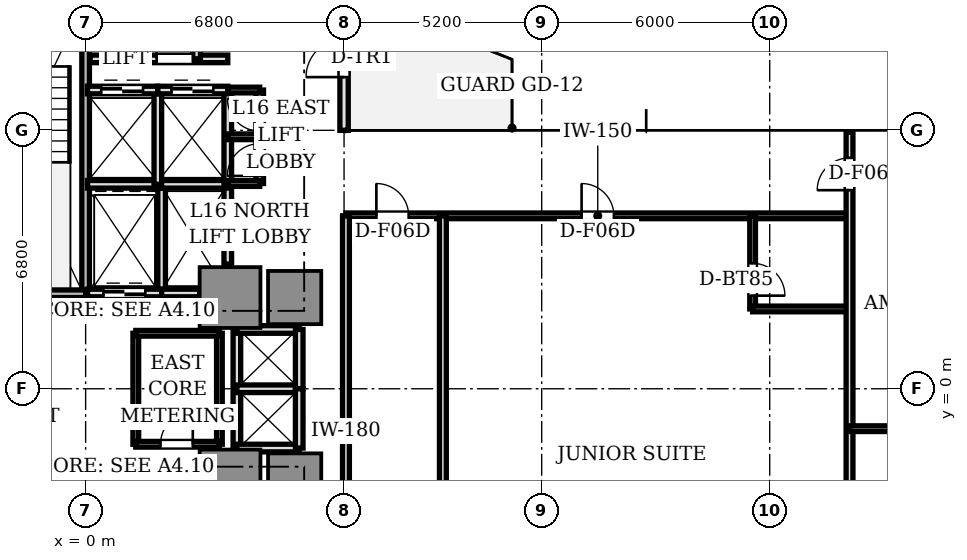
"""IFC4 building model, lengths in metres.
Left out: names, types, materials, properties, quantities, classifications, styles, units other than length and angle.
Written with IfcOpenShell. Run it as: python <this file> out.ifc"""

import sys

from ifc_helpers import new_model, si_unit, direction, frame, frame_2d, origin, origin_2d, place, context, subcontext, project, spatial, rectangle, extrude, source, transform, mapped, element, fill, save


model = new_model("IFC4")
c1 = context("Model", 3, precision=1e-05, world=origin(), true_north=direction((0.0, 1.0)))
c2 = subcontext(c1, "Body", "Model", "MODEL_VIEW")
j1 = project(units=[si_unit("LENGTHUNIT", "METRE"), si_unit("PLANEANGLEUNIT", "RADIAN")], contexts=[c1])
p1 = place(None, origin())
s1 = spatial("IfcSite", under=j1, at=p1, CompositionType="ELEMENT")
p2 = place(p1, origin())
s2 = spatial("IfcBuilding", under=s1, at=p2, CompositionType="ELEMENT")
p3 = place(p2, frame((0.0, 0.0, 61.1)))
s3 = spatial("IfcBuildingStorey", under=s2, at=p3, CompositionType="ELEMENT", Elevation=61.1)
m1 = source(origin(), c2, "Body", "SweptSolid", [
    extrude(rectangle(XDim=1.6, YDim=1.6, at=origin_2d()), origin(), (0.0, 0.0, 1.0), 3.11),
])
for number, where, z_axis, x_axis in (
    (1, (3.8, 2.4, 0.0), (0.0, 0.0, 1.0), (1.0, 0.0, 0.0)),
    (2, (3.8, -2.4, 0.0), (0.0, 0.0, 1.0), (1.0, 0.0, 0.0)),
):
    element("IfcColumn", number, at=place(p3, frame(where, z_axis=z_axis, x_axis=x_axis)), inside=s3, PredefinedType="COLUMN", context=c2, shape_type="MappedRepresentation", body=[
        mapped(m1, transform((0.0, 0.0, 0.0), scale=1.0)),
    ])
m2 = source(origin(), c2, "Body", "SweptSolid", [
    extrude(rectangle(XDim=1.4, YDim=1.4, at=origin_2d()), origin(), (0.0, 0.0, 1.0), 3.11),
])
for number, where, z_axis, x_axis in (
    (3, (5.5, 2.4, 0.0), (0.0, 0.0, 1.0), (1.0, 0.0, 0.0)),
    (4, (5.5, -2.4, 0.0), (0.0, 0.0, 1.0), (1.0, 0.0, 0.0)),
):
    element("IfcColumn", number, at=place(p3, frame(where, z_axis=z_axis, x_axis=x_axis)), inside=s3, PredefinedType="COLUMN", context=c2, shape_type="MappedRepresentation", body=[
        mapped(m2, transform((0.0, 0.0, 0.0), scale=1.0)),
    ])
p4 = place(p3, frame((6.8, 6.8, 0.0), z_axis=(0.0, 0.0, 1.0), x_axis=(0.0, 1.0, 0.0)))
e5 = element("IfcWall", 5, at=p4, inside=s3, PredefinedType="STANDARD", context=c2, shape_type="SweptSolid", body=[
    extrude(rectangle(XDim=2.7, YDim=0.22, at=frame_2d((1.35, 0.0))), origin(), (0.0, 0.0, 1.0), 3.11),
])
p5 = place(p4, frame((1.4, 0.0, 0.0)))
e6 = element("IfcOpeningElement", 6, at=p5, cuts=e5, PredefinedType="OPENING", context=c2, shape_type="SweptSolid", body=[
    extrude(rectangle(XDim=1.0, YDim=2.2, at=frame_2d((0.5, 1.1))), frame((0.0, 0.12, 0.0), z_axis=(0.0, -1.0, 0.0), x_axis=(1.0, 0.0, 0.0)), (0.0, 0.0, 1.0), 0.24),
])
p6 = place(p3, frame((0.0, 2.5, 0.0), z_axis=(0.0, 0.0, 1.0), x_axis=(0.0, 1.0, 0.0)))
e7 = element("IfcWall", 7, at=p6, inside=s3, PredefinedType="SOLIDWALL", context=c2, shape_type="SweptSolid", body=[
    extrude(rectangle(XDim=7.68, YDim=0.2, at=frame_2d((3.84, 0.0))), origin(), (0.0, 0.0, 1.0), 3.11),
])
p7 = place(p6, frame((6.5, 0.0, 0.0)))
e8 = element("IfcOpeningElement", 8, at=p7, cuts=e7, PredefinedType="OPENING", context=c2, shape_type="SweptSolid", body=[
    extrude(rectangle(XDim=0.95, YDim=2.15, at=frame_2d((0.475, 1.075))), frame((0.0, 0.11, 0.0), z_axis=(0.0, -1.0, 0.0), x_axis=(1.0, 0.0, 0.0)), (0.0, 0.0, 1.0), 0.22),
])
p8 = place(p3, frame((-3.72, 2.5, 0.0), z_axis=(0.0, 0.0, 1.0), x_axis=(1.0, 0.0, 0.0)))
e9 = element("IfcWall", 9, at=p8, inside=s3, PredefinedType="SOLIDWALL", context=c2, shape_type="SweptSolid", body=[
    extrude(rectangle(XDim=3.72, YDim=0.2, at=frame_2d((1.86, 0.0))), origin(), (0.0, 0.0, 1.0), 3.11),
])
p9 = place(p3, frame((2.0, 2.5, 0.0), z_axis=(0.0, 0.0, 1.0), x_axis=(0.0, 1.0, 0.0)))
e10 = element("IfcWall", 10, at=p9, inside=s3, PredefinedType="SOLIDWALL", context=c2, shape_type="SweptSolid", body=[
    extrude(rectangle(XDim=2.78, YDim=0.2, at=frame_2d((1.39, 0.0))), origin(), (0.0, 0.0, 1.0), 2.66),
])
p10 = place(p3, frame((0.05, 2.52, 0.0), z_axis=(0.0, 0.0, 1.0), x_axis=(1.0, 0.0, 0.0)))
e11 = element("IfcWall", 11, at=p10, inside=s3, PredefinedType="SOLIDWALL", context=c2, shape_type="SweptSolid", body=[
    extrude(rectangle(XDim=1.95, YDim=0.2, at=frame_2d((0.975, 0.0))), origin(), (0.0, 0.0, 1.0), 2.66),
])
p11 = place(p10, frame((0.42, 0.0, 0.0)))
e12 = element("IfcOpeningElement", 12, at=p11, cuts=e11, PredefinedType="OPENING", context=c2, shape_type="SweptSolid", body=[
    extrude(rectangle(XDim=1.1, YDim=2.2, at=frame_2d((0.55, 1.1))), frame((0.0, 0.11, 0.0), z_axis=(0.0, -1.0, 0.0), x_axis=(1.0, 0.0, 0.0)), (0.0, 0.0, 1.0), 0.22),
])
p12 = place(p3, frame((2.0, 2.52, 0.0), z_axis=(0.0, 0.0, 1.0), x_axis=(1.0, 0.0, 0.0)))
e13 = element("IfcWall", 13, at=p12, inside=s3, PredefinedType="SOLIDWALL", context=c2, shape_type="SweptSolid", body=[
    extrude(rectangle(XDim=1.0, YDim=0.2, at=frame_2d((0.5, 0.0))), origin(), (0.0, 0.0, 1.0), 2.66),
])
p13 = place(p3, frame((3.74, 3.28, 0.0), z_axis=(0.0, 0.0, 1.0), x_axis=(0.0, 1.0, 0.0)))
e14 = element("IfcWall", 14, at=p13, inside=s3, PredefinedType="SOLIDWALL", context=c2, shape_type="SweptSolid", body=[
    extrude(rectangle(XDim=2.08, YDim=0.2, at=frame_2d((1.04, 0.0))), origin(), (0.0, 0.0, 1.0), 2.66),
])
p14 = place(p13, frame((0.44, 0.0, 0.0)))
e15 = element("IfcOpeningElement", 15, at=p14, cuts=e14, PredefinedType="OPENING", context=c2, shape_type="SweptSolid", body=[
    extrude(rectangle(XDim=1.2, YDim=2.2, at=frame_2d((0.6, 1.1))), frame((0.0, 0.11, 0.0), z_axis=(0.0, -1.0, 0.0), x_axis=(1.0, 0.0, 0.0)), (0.0, 0.0, 1.0), 0.22),
])
p15 = place(p3, frame((0.05, 5.38, 0.0), z_axis=(0.0, 0.0, 1.0), x_axis=(1.0, 0.0, 0.0)))
e16 = element("IfcWall", 16, at=p15, inside=s3, PredefinedType="SOLIDWALL", context=c2, shape_type="SweptSolid", body=[
    extrude(rectangle(XDim=3.69, YDim=0.2, at=frame_2d((1.845, 0.0))), origin(), (0.0, 0.0, 1.0), 2.66),
])
p16 = place(p3, frame((1.9, 5.38, 0.0), z_axis=(0.0, 0.0, 1.0), x_axis=(0.0, 1.0, 0.0)))
e17 = element("IfcWall", 17, at=p16, inside=s3, PredefinedType="SOLIDWALL", context=c2, shape_type="SweptSolid", body=[
    extrude(rectangle(XDim=2.48, YDim=0.2, at=frame_2d((1.24, 0.0))), origin(), (0.0, 0.0, 1.0), 2.66),
])
p17 = place(p3, frame((0.05, 7.86, 0.0), z_axis=(0.0, 0.0, 1.0), x_axis=(1.0, 0.0, 0.0)))
e18 = element("IfcWall", 18, at=p17, inside=s3, PredefinedType="SOLIDWALL", context=c2, shape_type="SweptSolid", body=[
    extrude(rectangle(XDim=1.85, YDim=0.2, at=frame_2d((0.925, 0.0))), origin(), (0.0, 0.0, 1.0), 2.66),
])
p18 = place(p17, frame((0.36, 0.0, 0.0)))
e19 = element("IfcOpeningElement", 19, at=p18, cuts=e18, PredefinedType="OPENING", context=c2, shape_type="SweptSolid", body=[
    extrude(rectangle(XDim=1.1, YDim=2.2, at=frame_2d((0.55, 1.1))), frame((0.0, 0.11, 0.0), z_axis=(0.0, -1.0, 0.0), x_axis=(1.0, 0.0, 0.0)), (0.0, 0.0, 1.0), 0.22),
])
p19 = place(p3, frame((3.74, 5.38, 0.0), z_axis=(0.0, 0.0, 1.0), x_axis=(0.0, 1.0, 0.0)))
e20 = element("IfcWall", 20, at=p19, inside=s3, PredefinedType="SOLIDWALL", context=c2, shape_type="SweptSolid", body=[
    extrude(rectangle(XDim=2.48, YDim=0.2, at=frame_2d((1.24, 0.0))), origin(), (0.0, 0.0, 1.0), 2.66),
])
p20 = place(p3, frame((1.9, 7.86, 0.0), z_axis=(0.0, 0.0, 1.0), x_axis=(1.0, 0.0, 0.0)))
e21 = element("IfcWall", 21, at=p20, inside=s3, PredefinedType="SOLIDWALL", context=c2, shape_type="SweptSolid", body=[
    extrude(rectangle(XDim=1.84, YDim=0.2, at=frame_2d((0.92, 0.0))), origin(), (0.0, 0.0, 1.0), 2.66),
])
p21 = place(p20, frame((0.36, 0.0, 0.0)))
e22 = element("IfcOpeningElement", 22, at=p21, cuts=e21, PredefinedType="OPENING", context=c2, shape_type="SweptSolid", body=[
    extrude(rectangle(XDim=1.1, YDim=2.2, at=frame_2d((0.55, 1.1))), frame((0.0, 0.11, 0.0), z_axis=(0.0, -1.0, 0.0), x_axis=(1.0, 0.0, 0.0)), (0.0, 0.0, 1.0), 0.22),
])
p22 = place(p3, frame((3.98, -1.56, 0.0), z_axis=(0.0, 0.0, 1.0), x_axis=(0.0, 1.0, 0.0)))
e23 = element("IfcWall", 23, at=p22, inside=s3, PredefinedType="SOLIDWALL", context=c2, shape_type="SweptSolid", body=[
    extrude(rectangle(XDim=3.12, YDim=0.2, at=frame_2d((1.56, 0.0))), origin(), (0.0, 0.0, 1.0), 2.18),
])
for number, where, z_axis, x_axis in (
    (24, (3.98, 1.56, 0.0), (0.0, 0.0, 1.0), (1.0, 0.0, 0.0)),
    (25, (3.98, -1.56, 0.0), (0.0, 0.0, 1.0), (1.0, 0.0, 0.0)),
    (26, (3.98, 0.0, 0.0), (0.0, 0.0, 1.0), (1.0, 0.0, 0.0)),
):
    element("IfcWall", number, at=place(p3, frame(where, z_axis=z_axis, x_axis=x_axis)), inside=s3, PredefinedType="SOLIDWALL", context=c2, shape_type="SweptSolid", body=[
        extrude(rectangle(XDim=1.64, YDim=0.2, at=frame_2d((0.82, 0.0))), origin(), (0.0, 0.0, 1.0), 2.66),
    ])
for number, where, z_axis, x_axis in (
    (27, (5.62, 0.0, 0.0), (0.0, 0.0, 1.0), (0.0, 1.0, 0.0)),
    (28, (5.62, -1.56, 0.0), (0.0, 0.0, 1.0), (0.0, 1.0, 0.0)),
):
    element("IfcWall", number, at=place(p3, frame(where, z_axis=z_axis, x_axis=x_axis)), inside=s3, PredefinedType="SOLIDWALL", context=c2, shape_type="SweptSolid", body=[
        extrude(rectangle(XDim=1.56, YDim=0.2, at=frame_2d((0.78, 0.0))), origin(), (0.0, 0.0, 1.0), 2.66),
    ])
p23 = place(p3, frame((0.12, 8.68, 0.0), z_axis=(0.0, 0.0, 1.0), x_axis=(1.0, 0.0, 0.0)))
e29 = element("IfcWall", 29, at=p23, inside=s3, PredefinedType="SOLIDWALL", context=c2, shape_type="SweptSolid", body=[
    extrude(rectangle(XDim=3.62, YDim=0.2, at=frame_2d((1.81, 0.0))), origin(), (0.0, 0.0, 1.0), 2.66),
])
p24 = place(p23, frame((1.75, 0.0, 0.0)))
e30 = element("IfcOpeningElement", 30, at=p24, cuts=e29, PredefinedType="OPENING", context=c2, shape_type="SweptSolid", body=[
    extrude(rectangle(XDim=0.95, YDim=2.15, at=frame_2d((0.475, 1.075))), frame((0.0, 0.11, 0.0), z_axis=(0.0, -1.0, 0.0), x_axis=(1.0, 0.0, 0.0)), (0.0, 0.0, 1.0), 0.22),
])
p25 = place(p3, frame((2.92, 8.68, 0.0), z_axis=(0.0, 0.0, 1.0), x_axis=(0.0, 1.0, 0.0)))
e31 = element("IfcWall", 31, at=p25, inside=s3, PredefinedType="SOLIDWALL", context=c2, shape_type="SweptSolid", body=[
    extrude(rectangle(XDim=1.32, YDim=0.2, at=frame_2d((0.66, 0.0))), origin(), (0.0, 0.0, 1.0), 2.66),
])
p26 = place(p3, frame((4.58, 5.4, 0.0), z_axis=(0.0, 0.0, 1.0), x_axis=(0.0, 1.0, 0.0)))
e32 = element("IfcWall", 32, at=p26, inside=s3, PredefinedType="SOLIDWALL", context=c2, shape_type="SweptSolid", body=[
    extrude(rectangle(XDim=2.46, YDim=0.2, at=frame_2d((1.23, 0.0))), origin(), (0.0, 0.0, 1.0), 2.66),
])
p27 = place(p26, frame((0.2, 0.0, 0.0)))
e33 = element("IfcOpeningElement", 33, at=p27, cuts=e32, PredefinedType="OPENING", context=c2, shape_type="SweptSolid", body=[
    extrude(rectangle(XDim=0.85, YDim=2.1, at=frame_2d((0.425, 1.05))), frame((0.0, 0.11, 0.0), z_axis=(0.0, -1.0, 0.0), x_axis=(1.0, 0.0, 0.0)), (0.0, 0.0, 1.0), 0.22),
])
p28 = place(p26, frame((1.38, 0.0, 0.0)))
e34 = element("IfcOpeningElement", 34, at=p28, cuts=e32, PredefinedType="OPENING", context=c2, shape_type="SweptSolid", body=[
    extrude(rectangle(XDim=0.85, YDim=2.1, at=frame_2d((0.425, 1.05))), frame((0.0, 0.11, 0.0), z_axis=(0.0, -1.0, 0.0), x_axis=(1.0, 0.0, 0.0)), (0.0, 0.0, 1.0), 0.22),
])
for number, where, z_axis, x_axis in (
    (35, (3.74, 5.4, 0.0), (0.0, 0.0, 1.0), (1.0, 0.0, 0.0)),
    (36, (3.74, 7.86, 0.0), (0.0, 0.0, 1.0), (1.0, 0.0, 0.0)),
    (37, (3.74, 6.63, 0.0), (0.0, 0.0, 1.0), (1.0, 0.0, 0.0)),
):
    element("IfcWall", number, at=place(p3, frame(where, z_axis=z_axis, x_axis=x_axis)), inside=s3, PredefinedType="PARTITIONING", context=c2, shape_type="SweptSolid", body=[
        extrude(rectangle(XDim=0.84, YDim=0.15, at=frame_2d((0.42, 0.0))), origin(), (0.0, 0.0, 1.0), 2.66),
    ])
p29 = place(p3, frame((1.32, -1.46, 0.0), z_axis=(0.0, 0.0, 1.0), x_axis=(0.0, 1.0, 0.0)))
e38 = element("IfcWall", 38, at=p29, inside=s3, PredefinedType="PARTITIONING", context=c2, shape_type="SweptSolid", body=[
    extrude(rectangle(XDim=2.92, YDim=0.15, at=frame_2d((1.46, 0.0))), origin(), (0.0, 0.0, 1.0), 2.66),
])
p30 = place(p3, frame((3.52, -1.46, 0.0), z_axis=(0.0, 0.0, 1.0), x_axis=(0.0, 1.0, 0.0)))
e39 = element("IfcWall", 39, at=p30, inside=s3, PredefinedType="PARTITIONING", context=c2, shape_type="SweptSolid", body=[
    extrude(rectangle(XDim=2.92, YDim=0.15, at=frame_2d((1.46, 0.0))), origin(), (0.0, 0.0, 1.0), 2.18),
])
p31 = place(p3, frame((1.32, 1.46, 0.0), z_axis=(0.0, 0.0, 1.0), x_axis=(1.0, 0.0, 0.0)))
e40 = element("IfcWall", 40, at=p31, inside=s3, PredefinedType="PARTITIONING", context=c2, shape_type="SweptSolid", body=[
    extrude(rectangle(XDim=2.2, YDim=0.15, at=frame_2d((1.1, 0.0))), origin(), (0.0, 0.0, 1.0), 2.66),
])
p32 = place(p3, frame((1.32, -1.46, 0.0), z_axis=(0.0, 0.0, 1.0), x_axis=(1.0, 0.0, 0.0)))
e41 = element("IfcWall", 41, at=p32, inside=s3, PredefinedType="PARTITIONING", context=c2, shape_type="SweptSolid", body=[
    extrude(rectangle(XDim=2.2, YDim=0.15, at=frame_2d((1.1, 0.0))), origin(), (0.0, 0.0, 1.0), 2.66),
])
p33 = place(p32, frame((0.65, 0.0, 0.0)))
e42 = element("IfcOpeningElement", 42, at=p33, cuts=e41, PredefinedType="OPENING", context=c2, shape_type="SweptSolid", body=[
    extrude(rectangle(XDim=0.85, YDim=2.1, at=frame_2d((0.425, 1.05))), frame((0.0, 0.085, 0.0), z_axis=(0.0, -1.0, 0.0), x_axis=(1.0, 0.0, 0.0)), (0.0, 0.0, 1.0), 0.17),
])
p34 = place(p3, frame((6.85, 4.55, 0.0), z_axis=(0.0, 0.0, 1.0), x_axis=(1.0, 0.0, 0.0)))
e43 = element("IfcWall", 43, at=p34, inside=s3, PredefinedType="PARTITIONING", context=c2, shape_type="SweptSolid", body=[
    extrude(rectangle(XDim=13.25, YDim=0.15, at=frame_2d((6.625, 0.0))), origin(), (0.0, 0.0, 1.0), 2.63),
])
p35 = place(p34, frame((0.8, 0.0, 0.0)))
e44 = element("IfcOpeningElement", 44, at=p35, cuts=e43, PredefinedType="OPENING", context=c2, shape_type="SweptSolid", body=[
    extrude(rectangle(XDim=0.85, YDim=2.1, at=frame_2d((0.425, 1.05))), frame((0.0, 0.085, 0.0), z_axis=(0.0, -1.0, 0.0), x_axis=(1.0, 0.0, 0.0)), (0.0, 0.0, 1.0), 0.17),
])
p36 = place(p34, frame((6.2, 0.0, 0.0)))
e45 = element("IfcOpeningElement", 45, at=p36, cuts=e43, PredefinedType="OPENING", context=c2, shape_type="SweptSolid", body=[
    extrude(rectangle(XDim=0.85, YDim=2.1, at=frame_2d((0.425, 1.05))), frame((0.0, 0.085, 0.0), z_axis=(0.0, -1.0, 0.0), x_axis=(1.0, 0.0, 0.0)), (0.0, 0.0, 1.0), 0.17),
])
for number, where, z_axis, x_axis in (
    (46, (6.85, -6.75, 0.0), (0.0, 0.0, 1.0), (0.0, 1.0, 0.0)),
    (47, (9.4, 4.55, 0.0), (0.0, 0.0, 1.0), (0.0, -1.0, 0.0)),
):
    element("IfcWall", number, at=place(p3, frame(where, z_axis=z_axis, x_axis=x_axis)), inside=s3, PredefinedType="PARTITIONING", context=c2, shape_type="SweptSolid", body=[
        extrude(rectangle(XDim=11.3, YDim=0.18, at=frame_2d((5.65, 0.0))), origin(), (0.0, 0.0, 1.0), 2.66),
    ])
p37 = place(p3, frame((17.55, 4.55, 0.0), z_axis=(0.0, 0.0, 1.0), x_axis=(0.0, -1.0, 0.0)))
e48 = element("IfcWall", 48, at=p37, inside=s3, PredefinedType="PARTITIONING", context=c2, shape_type="SweptSolid", body=[
    extrude(rectangle(XDim=2.45, YDim=0.15, at=frame_2d((1.225, 0.0))), origin(), (0.0, 0.0, 1.0), 2.66),
])
p38 = place(p37, frame((1.25, 0.0, 0.0)))
e49 = element("IfcOpeningElement", 49, at=p38, cuts=e48, PredefinedType="OPENING", context=c2, shape_type="SweptSolid", body=[
    extrude(rectangle(XDim=0.85, YDim=2.1, at=frame_2d((0.425, 1.05))), frame((0.0, 0.085, 0.0), z_axis=(0.0, -1.0, 0.0), x_axis=(1.0, 0.0, 0.0)), (0.0, 0.0, 1.0), 0.17),
])
p39 = place(p3, frame((17.55, 2.1, 0.0), z_axis=(0.0, 0.0, 1.0), x_axis=(1.0, 0.0, 0.0)))
e50 = element("IfcWall", 50, at=p39, inside=s3, PredefinedType="PARTITIONING", context=c2, shape_type="SweptSolid", body=[
    extrude(rectangle(XDim=2.55, YDim=0.15, at=frame_2d((1.275, 0.0))), origin(), (0.0, 0.0, 1.0), 2.66),
])
p40 = place(p3, frame((20.1, -6.75, 0.0), z_axis=(0.0, 0.0, 1.0), x_axis=(0.0, 1.0, 0.0)))
e51 = element("IfcWall", 51, at=p40, inside=s3, PredefinedType="PARTITIONING", context=c2, shape_type="SweptSolid", body=[
    extrude(rectangle(XDim=13.5, YDim=0.18, at=frame_2d((6.75, 0.0))), origin(), (0.0, 0.0, 1.0), 2.66),
])
p41 = place(p40, frame((11.975, 0.0, 0.0)))
e52 = element("IfcOpeningElement", 52, at=p41, cuts=e51, PredefinedType="OPENING", context=c2, shape_type="SweptSolid", body=[
    extrude(rectangle(XDim=0.85, YDim=2.1, at=frame_2d((0.425, 1.05))), frame((0.0, 0.1, 0.0), z_axis=(0.0, -1.0, 0.0), x_axis=(1.0, 0.0, 0.0)), (0.0, 0.0, 1.0), 0.2),
])
p42 = place(p3, frame((20.1, -1.05, 0.0), z_axis=(0.0, 0.0, 1.0), x_axis=(1.0, 0.0, 0.0)))
e53 = element("IfcWall", 53, at=p42, inside=s3, PredefinedType="PARTITIONING", context=c2, shape_type="SweptSolid", body=[
    extrude(rectangle(XDim=2.05, YDim=0.15, at=frame_2d((1.025, 0.0))), origin(), (0.0, 0.0, 1.0), 2.66),
])
m3 = source(origin(), c2, "Body", "SweptSolid", [
    extrude(rectangle(XDim=1.0, YDim=0.05, at=origin_2d()), origin(), (0.0, 0.0, 1.0), 2.2),
])
p43 = place(p5, frame((0.5, 0.0, 0.0)))
e54 = element("IfcDoor", 54, at=p43, inside=s3, OperationType="SINGLE_SWING_LEFT", PredefinedType="DOOR", context=c2, shape_type="MappedRepresentation", body=[
    mapped(m3, transform((0.0, 0.0, 0.0), scale=1.0)),
])
fill(e6, e54)
m4 = source(origin(), c2, "Body", "SweptSolid", [
    extrude(rectangle(XDim=1.1, YDim=0.05, at=origin_2d()), origin(), (0.0, 0.0, 1.0), 2.2),
])
p44 = place(p11, frame((0.55, 0.0, 0.0)))
e55 = element("IfcDoor", 55, at=p44, inside=s3, OperationType="DOUBLE_DOOR_SLIDING", PredefinedType="DOOR", context=c2, shape_type="MappedRepresentation", body=[
    mapped(m4, transform((0.0, 0.0, 0.0), scale=1.0)),
])
fill(e12, e55)
m5 = source(origin(), c2, "Body", "SweptSolid", [
    extrude(rectangle(XDim=1.2, YDim=0.05, at=origin_2d()), origin(), (0.0, 0.0, 1.0), 2.2),
])
p45 = place(p14, frame((0.6, 0.0, 0.0)))
e56 = element("IfcDoor", 56, at=p45, inside=s3, OperationType="DOUBLE_DOOR_SLIDING", PredefinedType="DOOR", context=c2, shape_type="MappedRepresentation", body=[
    mapped(m5, transform((0.0, 0.0, 0.0), scale=1.0)),
])
fill(e15, e56)
p46 = place(p18, frame((0.55, 0.0, 0.0)))
e57 = element("IfcDoor", 57, at=p46, inside=s3, OperationType="DOUBLE_DOOR_SLIDING", PredefinedType="DOOR", context=c2, shape_type="MappedRepresentation", body=[
    mapped(m4, transform((0.0, 0.0, 0.0), scale=1.0)),
])
fill(e19, e57)
p47 = place(p21, frame((0.55, 0.0, 0.0)))
e58 = element("IfcDoor", 58, at=p47, inside=s3, OperationType="DOUBLE_DOOR_SLIDING", PredefinedType="DOOR", context=c2, shape_type="MappedRepresentation", body=[
    mapped(m4, transform((0.0, 0.0, 0.0), scale=1.0)),
])
fill(e22, e58)
m6 = source(origin(), c2, "Body", "SweptSolid", [
    extrude(rectangle(XDim=0.95, YDim=0.05, at=origin_2d()), origin(), (0.0, 0.0, 1.0), 2.15),
])
p48 = place(p24, frame((0.475, 0.0, 0.0)))
e59 = element("IfcDoor", 59, at=p48, inside=s3, OperationType="SINGLE_SWING_LEFT", PredefinedType="DOOR", context=c2, shape_type="MappedRepresentation", body=[
    mapped(m6, transform((0.0, 0.0, 0.0), scale=1.0)),
])
fill(e30, e59)
m7 = source(origin(), c2, "Body", "SweptSolid", [
    extrude(rectangle(XDim=0.85, YDim=0.05, at=origin_2d()), origin(), (0.0, 0.0, 1.0), 2.1),
])
p49 = place(p27, frame((0.425, 0.0, 0.0)))
e60 = element("IfcDoor", 60, at=p49, inside=s3, OperationType="SINGLE_SWING_LEFT", PredefinedType="DOOR", context=c2, shape_type="MappedRepresentation", body=[
    mapped(m7, transform((0.0, 0.0, 0.0), scale=1.0)),
])
fill(e33, e60)
p50 = place(p28, frame((0.425, 0.0, 0.0)))
e61 = element("IfcDoor", 61, at=p50, inside=s3, OperationType="SINGLE_SWING_RIGHT", PredefinedType="DOOR", context=c2, shape_type="MappedRepresentation", body=[
    mapped(m7, transform((0.0, 0.0, 0.0), scale=1.0)),
])
fill(e34, e61)
p51 = place(p33, frame((0.425, 0.0, 0.0)))
e62 = element("IfcDoor", 62, at=p51, inside=s3, OperationType="SINGLE_SWING_RIGHT", PredefinedType="DOOR", context=c2, shape_type="MappedRepresentation", body=[
    mapped(m7, transform((0.0, 0.0, 0.0), scale=1.0)),
])
fill(e42, e62)
p52 = place(p35, frame((0.425, 0.0, 0.0)))
e63 = element("IfcDoor", 63, at=p52, inside=s3, OperationType="SINGLE_SWING_LEFT", PredefinedType="DOOR", context=c2, shape_type="MappedRepresentation", body=[
    mapped(m7, transform((0.0, 0.0, 0.0), scale=1.0)),
])
fill(e44, e63)
p53 = place(p38, frame((0.425, 0.0, 0.0)))
e64 = element("IfcDoor", 64, at=p53, inside=s3, OperationType="SINGLE_SWING_RIGHT", PredefinedType="DOOR", context=c2, shape_type="MappedRepresentation", body=[
    mapped(m7, transform((0.0, 0.0, 0.0), scale=1.0)),
])
fill(e49, e64)
p54 = place(p36, frame((0.425, 0.0, 0.0)))
e65 = element("IfcDoor", 65, at=p54, inside=s3, OperationType="SINGLE_SWING_LEFT", PredefinedType="DOOR", context=c2, shape_type="MappedRepresentation", body=[
    mapped(m7, transform((0.0, 0.0, 0.0), scale=1.0)),
])
fill(e45, e65)
p55 = place(p41, frame((0.425, 0.0, 0.0)))
e66 = element("IfcDoor", 66, at=p55, inside=s3, OperationType="SINGLE_SWING_LEFT", PredefinedType="DOOR", context=c2, shape_type="MappedRepresentation", body=[
    mapped(m7, transform((0.0, 0.0, 0.0), scale=1.0)),
])
fill(e52, e66)
save(model, sys.argv[1])
